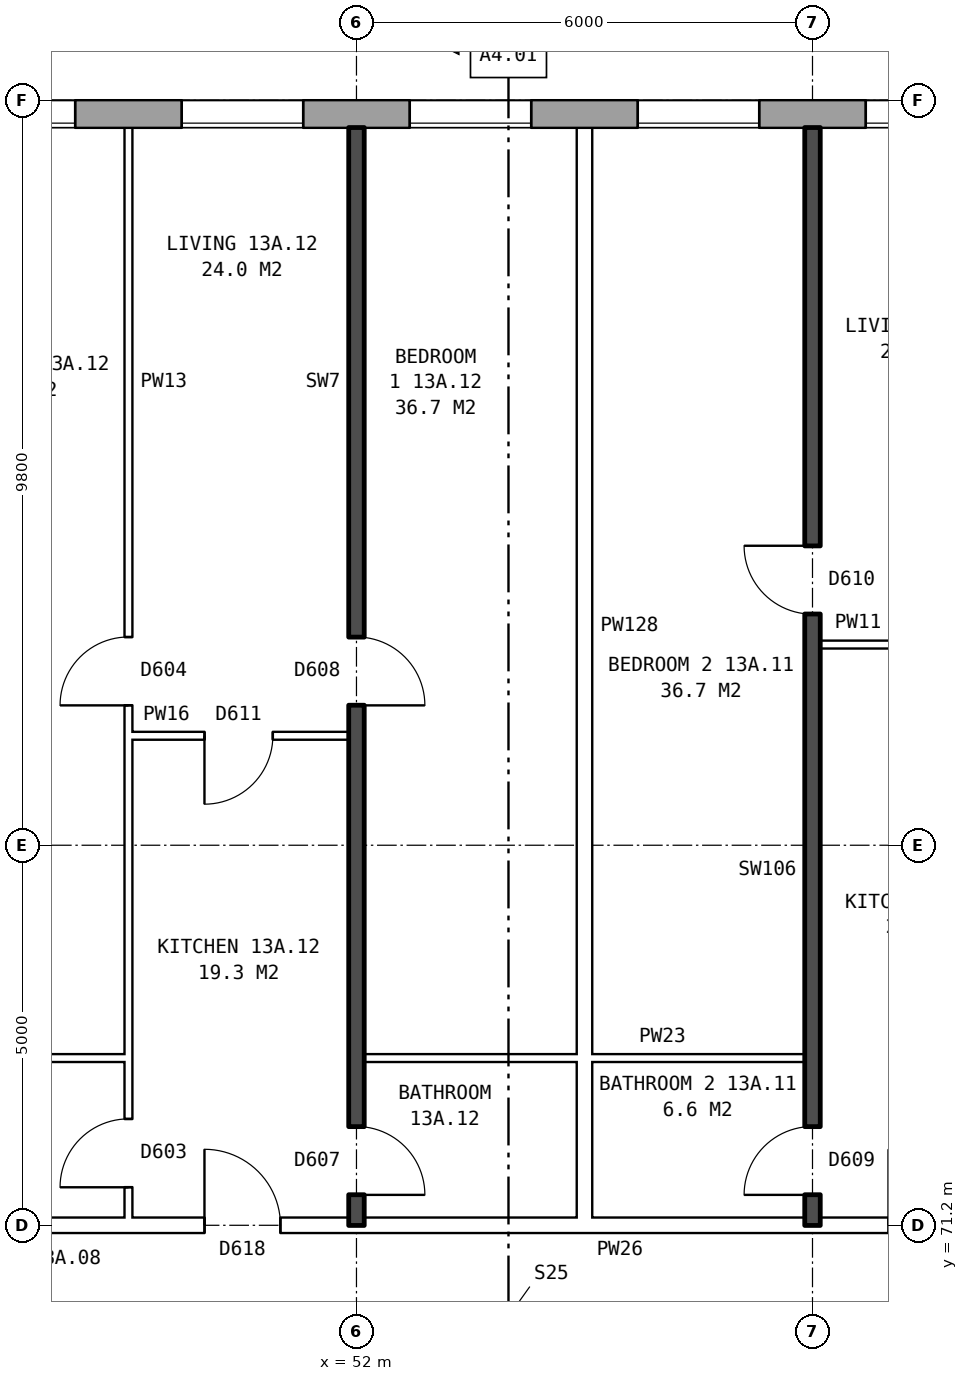
"""IFC4 building model, lengths in metres.
Left out: names, types, materials, properties, quantities, classifications, styles, units other than length and angle.
Written with IfcOpenShell. Run it as: python <this file> out.ifc"""

import sys

from ifc_helpers import new_model, si_unit, direction, frame, frame_2d, origin, place, context, subcontext, project, spatial, rectangle, extrude, element, fill, save


model = new_model("IFC4")
c1 = context("Model", 3, precision=1e-05, world=origin(), true_north=direction((0.0, 1.0)))
c2 = subcontext(c1, "Body", "Model", "MODEL_VIEW")
j1 = project(units=[si_unit("LENGTHUNIT", "METRE"), si_unit("PLANEANGLEUNIT", "RADIAN")], contexts=[c1])
p1 = place(None, origin())
s1 = spatial("IfcSite", under=j1, at=p1, CompositionType="ELEMENT")
p2 = place(p1, origin())
s2 = spatial("IfcBuilding", under=s1, at=p2, CompositionType="ELEMENT")
p3 = place(p2, frame((0.0, 0.0, 50.5)))
s3 = spatial("IfcBuildingStorey", under=s2, at=p3, CompositionType="ELEMENT", Elevation=50.5)
p4 = place(p3, frame((72.925, 85.82, 0.0), z_axis=(0.0, 0.0, 1.0), x_axis=(-1.0, 0.0, 0.0)))
e1 = element("IfcWall", 1, at=p4, inside=s3, PredefinedType="STANDARD", context=c2, shape_type="SweptSolid", body=[
    extrude(rectangle(XDim=48.351, YDim=0.36, at=frame_2d((24.175, 0.0))), origin(), (0.0, 0.0, 1.0), 2.85),
])
p5 = place(p4, frame((0.625, 0.0, 0.8)))
e2 = element("IfcOpeningElement", 2, at=p5, cuts=e1, PredefinedType="OPENING", context=c2, shape_type="SweptSolid", body=[
    extrude(rectangle(XDim=1.6, YDim=1.8, at=frame_2d((0.8, 0.9))), frame((0.0, 0.19, 0.0), z_axis=(0.0, -1.0, 0.0), x_axis=(1.0, 0.0, 0.0)), (0.0, 0.0, 1.0), 0.38),
])
p6 = place(p4, frame((3.625, 0.0, 0.8)))
e3 = element("IfcOpeningElement", 3, at=p6, cuts=e1, PredefinedType="OPENING", context=c2, shape_type="SweptSolid", body=[
    extrude(rectangle(XDim=1.6, YDim=1.8, at=frame_2d((0.8, 0.9))), frame((0.0, 0.19, 0.0), z_axis=(0.0, -1.0, 0.0), x_axis=(1.0, 0.0, 0.0)), (0.0, 0.0, 1.0), 0.38),
])
p7 = place(p4, frame((5.525, 0.0, 0.8)))
e4 = element("IfcOpeningElement", 4, at=p7, cuts=e1, PredefinedType="OPENING", context=c2, shape_type="SweptSolid", body=[
    extrude(rectangle(XDim=1.4, YDim=1.8, at=frame_2d((0.7, 0.9))), frame((0.0, 0.19, 0.0), z_axis=(0.0, -1.0, 0.0), x_axis=(1.0, 0.0, 0.0)), (0.0, 0.0, 1.0), 0.38),
])
p8 = place(p4, frame((9.225, 0.0, 0.45)))
e5 = element("IfcOpeningElement", 5, at=p8, cuts=e1, PredefinedType="OPENING", context=c2, shape_type="SweptSolid", body=[
    extrude(rectangle(XDim=1.0, YDim=0.9, at=frame_2d((0.5, 0.45))), frame((0.0, 0.19, 0.0), z_axis=(0.0, -1.0, 0.0), x_axis=(1.0, 0.0, 0.0)), (0.0, 0.0, 1.0), 0.38),
])
p9 = place(p4, frame((12.625, 0.0, 0.8)))
e6 = element("IfcOpeningElement", 6, at=p9, cuts=e1, PredefinedType="OPENING", context=c2, shape_type="SweptSolid", body=[
    extrude(rectangle(XDim=1.6, YDim=1.8, at=frame_2d((0.8, 0.9))), frame((0.0, 0.19, 0.0), z_axis=(0.0, -1.0, 0.0), x_axis=(1.0, 0.0, 0.0)), (0.0, 0.0, 1.0), 0.38),
])
p10 = place(p4, frame((15.625, 0.0, 0.8)))
e7 = element("IfcOpeningElement", 7, at=p10, cuts=e1, PredefinedType="OPENING", context=c2, shape_type="SweptSolid", body=[
    extrude(rectangle(XDim=1.6, YDim=1.8, at=frame_2d((0.8, 0.9))), frame((0.0, 0.19, 0.0), z_axis=(0.0, -1.0, 0.0), x_axis=(1.0, 0.0, 0.0)), (0.0, 0.0, 1.0), 0.38),
])
p11 = place(p4, frame((18.625, 0.0, 0.8)))
e8 = element("IfcOpeningElement", 8, at=p11, cuts=e1, PredefinedType="OPENING", context=c2, shape_type="SweptSolid", body=[
    extrude(rectangle(XDim=1.6, YDim=1.8, at=frame_2d((0.8, 0.9))), frame((0.0, 0.19, 0.0), z_axis=(0.0, -1.0, 0.0), x_axis=(1.0, 0.0, 0.0)), (0.0, 0.0, 1.0), 0.38),
])
p12 = place(p4, frame((21.625, 0.0, 0.8)))
e9 = element("IfcOpeningElement", 9, at=p12, cuts=e1, PredefinedType="OPENING", context=c2, shape_type="SweptSolid", body=[
    extrude(rectangle(XDim=1.6, YDim=1.8, at=frame_2d((0.8, 0.9))), frame((0.0, 0.19, 0.0), z_axis=(0.0, -1.0, 0.0), x_axis=(1.0, 0.0, 0.0)), (0.0, 0.0, 1.0), 0.38),
])
p13 = place(p4, frame((24.625, 0.0, 0.8)))
e10 = element("IfcOpeningElement", 10, at=p13, cuts=e1, PredefinedType="OPENING", context=c2, shape_type="SweptSolid", body=[
    extrude(rectangle(XDim=1.6, YDim=1.8, at=frame_2d((0.8, 0.9))), frame((0.0, 0.19, 0.0), z_axis=(0.0, -1.0, 0.0), x_axis=(1.0, 0.0, 0.0)), (0.0, 0.0, 1.0), 0.38),
])
p14 = place(p4, frame((27.625, 0.0, 0.8)))
e11 = element("IfcOpeningElement", 11, at=p14, cuts=e1, PredefinedType="OPENING", context=c2, shape_type="SweptSolid", body=[
    extrude(rectangle(XDim=1.6, YDim=1.8, at=frame_2d((0.8, 0.9))), frame((0.0, 0.19, 0.0), z_axis=(0.0, -1.0, 0.0), x_axis=(1.0, 0.0, 0.0)), (0.0, 0.0, 1.0), 0.38),
])
p15 = place(p4, frame((30.625, 0.0, 0.8)))
e12 = element("IfcOpeningElement", 12, at=p15, cuts=e1, PredefinedType="OPENING", context=c2, shape_type="SweptSolid", body=[
    extrude(rectangle(XDim=1.6, YDim=1.8, at=frame_2d((0.8, 0.9))), frame((0.0, 0.19, 0.0), z_axis=(0.0, -1.0, 0.0), x_axis=(1.0, 0.0, 0.0)), (0.0, 0.0, 1.0), 0.38),
])
p16 = place(p4, frame((33.625, 0.0, 0.8)))
e13 = element("IfcOpeningElement", 13, at=p16, cuts=e1, PredefinedType="OPENING", context=c2, shape_type="SweptSolid", body=[
    extrude(rectangle(XDim=1.6, YDim=1.8, at=frame_2d((0.8, 0.9))), frame((0.0, 0.19, 0.0), z_axis=(0.0, -1.0, 0.0), x_axis=(1.0, 0.0, 0.0)), (0.0, 0.0, 1.0), 0.38),
])
p17 = place(p4, frame((36.125, 0.0, 0.8)))
e14 = element("IfcOpeningElement", 14, at=p17, cuts=e1, PredefinedType="OPENING", context=c2, shape_type="SweptSolid", body=[
    extrude(rectangle(XDim=1.0, YDim=1.8, at=frame_2d((0.5, 0.9))), frame((0.0, 0.19, 0.0), z_axis=(0.0, -1.0, 0.0), x_axis=(1.0, 0.0, 0.0)), (0.0, 0.0, 1.0), 0.38),
])
p18 = place(p4, frame((39.975, 0.0, 1.7)))
e15 = element("IfcOpeningElement", 15, at=p18, cuts=e1, PredefinedType="OPENING", context=c2, shape_type="SweptSolid", body=[
    extrude(rectangle(XDim=1.0, YDim=0.9, at=frame_2d((0.5, 0.45))), frame((0.0, 0.19, 0.0), z_axis=(0.0, -1.0, 0.0), x_axis=(1.0, 0.0, 0.0)), (0.0, 0.0, 1.0), 0.38),
])
p19 = place(p4, frame((42.625, 0.0, 0.8)))
e16 = element("IfcOpeningElement", 16, at=p19, cuts=e1, PredefinedType="OPENING", context=c2, shape_type="SweptSolid", body=[
    extrude(rectangle(XDim=1.6, YDim=1.8, at=frame_2d((0.8, 0.9))), frame((0.0, 0.19, 0.0), z_axis=(0.0, -1.0, 0.0), x_axis=(1.0, 0.0, 0.0)), (0.0, 0.0, 1.0), 0.38),
])
p20 = place(p4, frame((45.625, 0.0, 0.8)))
e17 = element("IfcOpeningElement", 17, at=p20, cuts=e1, PredefinedType="OPENING", context=c2, shape_type="SweptSolid", body=[
    extrude(rectangle(XDim=1.6, YDim=1.8, at=frame_2d((0.8, 0.9))), frame((0.0, 0.19, 0.0), z_axis=(0.0, -1.0, 0.0), x_axis=(1.0, 0.0, 0.0)), (0.0, 0.0, 1.0), 0.38),
])
p21 = place(p4, frame((7.225, 0.0, 1.6)))
e18 = element("IfcOpeningElement", 18, at=p21, cuts=e1, PredefinedType="OPENING", context=c2, shape_type="SweptSolid", body=[
    extrude(rectangle(XDim=1.0, YDim=0.9, at=frame_2d((0.5, 0.45))), frame((0.0, 0.19, 0.0), z_axis=(0.0, -1.0, 0.0), x_axis=(1.0, 0.0, 0.0)), (0.0, 0.0, 1.0), 0.38),
])
p22 = place(p4, frame((10.575, 0.0, 0.45)))
e19 = element("IfcOpeningElement", 19, at=p22, cuts=e1, PredefinedType="OPENING", context=c2, shape_type="SweptSolid", body=[
    extrude(rectangle(XDim=1.2, YDim=1.8, at=frame_2d((0.6, 0.9))), frame((0.0, 0.19, 0.0), z_axis=(0.0, -1.0, 0.0), x_axis=(1.0, 0.0, 0.0)), (0.0, 0.0, 1.0), 0.38),
])
p23 = place(p4, frame((37.425, 0.0, 0.8)))
e20 = element("IfcOpeningElement", 20, at=p23, cuts=e1, PredefinedType="OPENING", context=c2, shape_type="SweptSolid", body=[
    extrude(rectangle(XDim=1.0, YDim=0.9, at=frame_2d((0.5, 0.45))), frame((0.0, 0.19, 0.0), z_axis=(0.0, -1.0, 0.0), x_axis=(1.0, 0.0, 0.0)), (0.0, 0.0, 1.0), 0.38),
])
p24 = place(p4, frame((41.275, 0.0, 0.8)))
e21 = element("IfcOpeningElement", 21, at=p24, cuts=e1, PredefinedType="OPENING", context=c2, shape_type="SweptSolid", body=[
    extrude(rectangle(XDim=1.0, YDim=1.8, at=frame_2d((0.5, 0.9))), frame((0.0, 0.19, 0.0), z_axis=(0.0, -1.0, 0.0), x_axis=(1.0, 0.0, 0.0)), (0.0, 0.0, 1.0), 0.38),
])
p25 = place(p3, frame((44.36, 71.2, 0.0), z_axis=(0.0, 0.0, 1.0), x_axis=(1.0, 0.0, 0.0)))
e22 = element("IfcWall", 22, at=p25, inside=s3, PredefinedType="PARTITIONING", context=c2, shape_type="SweptSolid", body=[
    extrude(rectangle(XDim=19.28, YDim=0.2, at=frame_2d((9.64, 0.0))), origin(), (0.0, 0.0, 1.0), 2.85),
])
p26 = place(p25, frame((14.64, 0.0, 0.0)))
e23 = element("IfcOpeningElement", 23, at=p26, cuts=e22, PredefinedType="OPENING", context=c2, shape_type="SweptSolid", body=[
    extrude(rectangle(XDim=1.0, YDim=2.1, at=frame_2d((0.5, 1.05))), frame((0.0, 0.11, 0.0), z_axis=(0.0, -1.0, 0.0), x_axis=(1.0, 0.0, 0.0)), (0.0, 0.0, 1.0), 0.22),
])
p27 = place(p25, frame((5.64, 0.0, 0.0)))
e24 = element("IfcOpeningElement", 24, at=p27, cuts=e22, PredefinedType="OPENING", context=c2, shape_type="SweptSolid", body=[
    extrude(rectangle(XDim=1.0, YDim=2.1, at=frame_2d((0.5, 1.05))), frame((0.0, 0.11, 0.0), z_axis=(0.0, -1.0, 0.0), x_axis=(1.0, 0.0, 0.0)), (0.0, 0.0, 1.0), 0.22),
])
p28 = place(p3, frame((46.1, 73.4, 0.0), z_axis=(0.0, 0.0, 1.0), x_axis=(1.0, 0.0, 0.0)))
e25 = element("IfcWall", 25, at=p28, inside=s3, PredefinedType="PARTITIONING", context=c2, shape_type="SweptSolid", body=[
    extrude(rectangle(XDim=2.9, YDim=0.1, at=frame_2d((1.45, 0.0))), origin(), (0.0, 0.0, 1.0), 2.85),
])
p29 = place(p3, frame((52.1, 73.4, 0.0), z_axis=(0.0, 0.0, 1.0), x_axis=(1.0, 0.0, 0.0)))
e26 = element("IfcWall", 26, at=p29, inside=s3, PredefinedType="PARTITIONING", context=c2, shape_type="SweptSolid", body=[
    extrude(rectangle(XDim=5.8, YDim=0.1, at=frame_2d((2.9, 0.0))), origin(), (0.0, 0.0, 1.0), 2.85),
])
p30 = place(p3, frame((49.0, 77.64, 0.0), z_axis=(0.0, 0.0, 1.0), x_axis=(1.0, 0.0, 0.0)))
e27 = element("IfcWall", 27, at=p30, inside=s3, PredefinedType="PARTITIONING", context=c2, shape_type="SweptSolid", body=[
    extrude(rectangle(XDim=2.9, YDim=0.1, at=frame_2d((1.45, 0.0))), origin(), (0.0, 0.0, 1.0), 2.85),
])
p31 = place(p30, frame((1.0, 0.0, 0.0)))
e28 = element("IfcOpeningElement", 28, at=p31, cuts=e27, PredefinedType="OPENING", context=c2, shape_type="SweptSolid", body=[
    extrude(rectangle(XDim=0.9, YDim=2.1, at=frame_2d((0.45, 1.05))), frame((0.0, 0.06, 0.0), z_axis=(0.0, -1.0, 0.0), x_axis=(1.0, 0.0, 0.0)), (0.0, 0.0, 1.0), 0.12),
])
p32 = place(p3, frame((58.1, 78.84, 0.0), z_axis=(0.0, 0.0, 1.0), x_axis=(1.0, 0.0, 0.0)))
e29 = element("IfcWall", 29, at=p32, inside=s3, PredefinedType="PARTITIONING", context=c2, shape_type="SweptSolid", body=[
    extrude(rectangle(XDim=2.9, YDim=0.1, at=frame_2d((1.45, 0.0))), origin(), (0.0, 0.0, 1.0), 2.85),
])
p33 = place(p32, frame((1.0, 0.0, 0.0)))
e30 = element("IfcOpeningElement", 30, at=p33, cuts=e29, PredefinedType="OPENING", context=c2, shape_type="SweptSolid", body=[
    extrude(rectangle(XDim=0.9, YDim=2.1, at=frame_2d((0.45, 1.05))), frame((0.0, 0.06, 0.0), z_axis=(0.0, -1.0, 0.0), x_axis=(1.0, 0.0, 0.0)), (0.0, 0.0, 1.0), 0.12),
])
p34 = place(p3, frame((49.0, 71.3, 0.0), z_axis=(0.0, 0.0, 1.0), x_axis=(0.0, 1.0, 0.0)))
e31 = element("IfcWall", 31, at=p34, inside=s3, PredefinedType="PARTITIONING", context=c2, shape_type="SweptSolid", body=[
    extrude(rectangle(XDim=14.34, YDim=0.1, at=frame_2d((7.17, 0.0))), origin(), (0.0, 0.0, 1.0), 2.85),
])
p35 = place(p34, frame((6.74, 0.0, 0.0)))
e32 = element("IfcOpeningElement", 32, at=p35, cuts=e31, PredefinedType="OPENING", context=c2, shape_type="SweptSolid", body=[
    extrude(rectangle(XDim=0.9, YDim=2.1, at=frame_2d((0.45, 1.05))), frame((0.0, 0.06, 0.0), z_axis=(0.0, -1.0, 0.0), x_axis=(1.0, 0.0, 0.0)), (0.0, 0.0, 1.0), 0.12),
])
p36 = place(p34, frame((0.4, 0.0, 0.0)))
e33 = element("IfcOpeningElement", 33, at=p36, cuts=e31, PredefinedType="OPENING", context=c2, shape_type="SweptSolid", body=[
    extrude(rectangle(XDim=0.9, YDim=2.1, at=frame_2d((0.45, 1.05))), frame((0.0, 0.06, 0.0), z_axis=(0.0, -1.0, 0.0), x_axis=(1.0, 0.0, 0.0)), (0.0, 0.0, 1.0), 0.12),
])
p37 = place(p3, frame((52.0, 71.2, 0.0), z_axis=(0.0, 0.0, 1.0), x_axis=(0.0, 1.0, 0.0)))
e34 = element("IfcWall", 34, at=p37, inside=s3, PredefinedType="SOLIDWALL", context=c2, shape_type="SweptSolid", body=[
    extrude(rectangle(XDim=14.44, YDim=0.2, at=frame_2d((7.22, 0.0))), origin(), (0.0, 0.0, 1.0), 2.85),
])
p38 = place(p37, frame((6.84, 0.0, 0.0)))
e35 = element("IfcOpeningElement", 35, at=p38, cuts=e34, PredefinedType="OPENING", context=c2, shape_type="SweptSolid", body=[
    extrude(rectangle(XDim=0.9, YDim=2.1, at=frame_2d((0.45, 1.05))), frame((0.0, 0.11, 0.0), z_axis=(0.0, -1.0, 0.0), x_axis=(1.0, 0.0, 0.0)), (0.0, 0.0, 1.0), 0.22),
])
p39 = place(p37, frame((0.4, 0.0, 0.0)))
e36 = element("IfcOpeningElement", 36, at=p39, cuts=e34, PredefinedType="OPENING", context=c2, shape_type="SweptSolid", body=[
    extrude(rectangle(XDim=0.9, YDim=2.1, at=frame_2d((0.45, 1.05))), frame((0.0, 0.11, 0.0), z_axis=(0.0, -1.0, 0.0), x_axis=(1.0, 0.0, 0.0)), (0.0, 0.0, 1.0), 0.22),
])
p40 = place(p3, frame((55.0, 71.3, 0.0), z_axis=(0.0, 0.0, 1.0), x_axis=(0.0, 1.0, 0.0)))
e37 = element("IfcWall", 37, at=p40, inside=s3, PredefinedType="PARTITIONING", context=c2, shape_type="SweptSolid", body=[
    extrude(rectangle(XDim=14.34, YDim=0.2, at=frame_2d((7.17, 0.0))), origin(), (0.0, 0.0, 1.0), 2.85),
])
p41 = place(p3, frame((58.0, 71.2, 0.0), z_axis=(0.0, 0.0, 1.0), x_axis=(0.0, 1.0, 0.0)))
e38 = element("IfcWall", 38, at=p41, inside=s3, PredefinedType="SOLIDWALL", context=c2, shape_type="SweptSolid", body=[
    extrude(rectangle(XDim=14.44, YDim=0.2, at=frame_2d((7.22, 0.0))), origin(), (0.0, 0.0, 1.0), 2.85),
])
p42 = place(p41, frame((8.04, 0.0, 0.0)))
e39 = element("IfcOpeningElement", 39, at=p42, cuts=e38, PredefinedType="OPENING", context=c2, shape_type="SweptSolid", body=[
    extrude(rectangle(XDim=0.9, YDim=2.1, at=frame_2d((0.45, 1.05))), frame((0.0, 0.11, 0.0), z_axis=(0.0, -1.0, 0.0), x_axis=(1.0, 0.0, 0.0)), (0.0, 0.0, 1.0), 0.22),
])
p43 = place(p41, frame((0.4, 0.0, 0.0)))
e40 = element("IfcOpeningElement", 40, at=p43, cuts=e38, PredefinedType="OPENING", context=c2, shape_type="SweptSolid", body=[
    extrude(rectangle(XDim=0.9, YDim=2.1, at=frame_2d((0.45, 1.05))), frame((0.0, 0.11, 0.0), z_axis=(0.0, -1.0, 0.0), x_axis=(1.0, 0.0, 0.0)), (0.0, 0.0, 1.0), 0.22),
])
p44 = place(p9, origin())
e41 = element("IfcWindow", 41, at=p44, inside=s3, PartitioningType="SINGLE_PANEL", PredefinedType="WINDOW", context=c2, shape_type="SweptSolid", body=[
    extrude(rectangle(XDim=1.6, YDim=1.8, at=frame_2d((0.8, 0.9))), frame((0.0, 0.15, 0.0), z_axis=(0.0, -1.0, 0.0), x_axis=(1.0, 0.0, 0.0)), (0.0, 0.0, 1.0), 0.06),
])
fill(e6, e41)
p45 = place(p10, origin())
e42 = element("IfcWindow", 42, at=p45, inside=s3, PartitioningType="SINGLE_PANEL", PredefinedType="WINDOW", context=c2, shape_type="SweptSolid", body=[
    extrude(rectangle(XDim=1.6, YDim=1.8, at=frame_2d((0.8, 0.9))), frame((0.0, 0.15, 0.0), z_axis=(0.0, -1.0, 0.0), x_axis=(1.0, 0.0, 0.0)), (0.0, 0.0, 1.0), 0.06),
])
fill(e7, e42)
p46 = place(p11, origin())
e43 = element("IfcWindow", 43, at=p46, inside=s3, PartitioningType="SINGLE_PANEL", PredefinedType="WINDOW", context=c2, shape_type="SweptSolid", body=[
    extrude(rectangle(XDim=1.6, YDim=1.8, at=frame_2d((0.8, 0.9))), frame((0.0, 0.15, 0.0), z_axis=(0.0, -1.0, 0.0), x_axis=(1.0, 0.0, 0.0)), (0.0, 0.0, 1.0), 0.06),
])
fill(e8, e43)
p47 = place(p12, origin())
e44 = element("IfcWindow", 44, at=p47, inside=s3, PartitioningType="SINGLE_PANEL", PredefinedType="WINDOW", context=c2, shape_type="SweptSolid", body=[
    extrude(rectangle(XDim=1.6, YDim=1.8, at=frame_2d((0.8, 0.9))), frame((0.0, 0.15, 0.0), z_axis=(0.0, -1.0, 0.0), x_axis=(1.0, 0.0, 0.0)), (0.0, 0.0, 1.0), 0.06),
])
fill(e9, e44)
p48 = place(p13, origin())
e45 = element("IfcWindow", 45, at=p48, inside=s3, PartitioningType="SINGLE_PANEL", PredefinedType="WINDOW", context=c2, shape_type="SweptSolid", body=[
    extrude(rectangle(XDim=1.6, YDim=1.8, at=frame_2d((0.8, 0.9))), frame((0.0, 0.15, 0.0), z_axis=(0.0, -1.0, 0.0), x_axis=(1.0, 0.0, 0.0)), (0.0, 0.0, 1.0), 0.06),
])
fill(e10, e45)
p49 = place(p42, origin())
e46 = element("IfcDoor", 46, at=p49, inside=s3, OperationType="SINGLE_SWING_RIGHT", PredefinedType="DOOR", context=c2, shape_type="SweptSolid", body=[
    extrude(rectangle(XDim=0.9, YDim=2.1, at=frame_2d((0.45, 1.05))), frame((0.0, 0.025, 0.0), z_axis=(0.0, -1.0, 0.0), x_axis=(1.0, 0.0, 0.0)), (0.0, 0.0, 1.0), 0.05),
])
fill(e39, e46)
p50 = place(p43, origin())
e47 = element("IfcDoor", 47, at=p50, inside=s3, OperationType="SINGLE_SWING_LEFT", PredefinedType="DOOR", context=c2, shape_type="SweptSolid", body=[
    extrude(rectangle(XDim=0.9, YDim=2.1, at=frame_2d((0.45, 1.05))), frame((0.0, 0.025, 0.0), z_axis=(0.0, -1.0, 0.0), x_axis=(1.0, 0.0, 0.0)), (0.0, 0.0, 1.0), 0.05),
])
fill(e40, e47)
p51 = place(p38, frame((0.9, 0.0, 0.0), z_axis=(0.0, 0.0, 1.0), x_axis=(-1.0, 0.0, 0.0)))
e48 = element("IfcDoor", 48, at=p51, inside=s3, OperationType="SINGLE_SWING_RIGHT", PredefinedType="DOOR", context=c2, shape_type="SweptSolid", body=[
    extrude(rectangle(XDim=0.9, YDim=2.1, at=frame_2d((0.45, 1.05))), frame((0.0, 0.025, 0.0), z_axis=(0.0, -1.0, 0.0), x_axis=(1.0, 0.0, 0.0)), (0.0, 0.0, 1.0), 0.05),
])
fill(e35, e48)
p52 = place(p35, origin())
e49 = element("IfcDoor", 49, at=p52, inside=s3, OperationType="SINGLE_SWING_LEFT", PredefinedType="DOOR", context=c2, shape_type="SweptSolid", body=[
    extrude(rectangle(XDim=0.9, YDim=2.1, at=frame_2d((0.45, 1.05))), frame((0.0, 0.025, 0.0), z_axis=(0.0, -1.0, 0.0), x_axis=(1.0, 0.0, 0.0)), (0.0, 0.0, 1.0), 0.05),
])
fill(e32, e49)
p53 = place(p27, origin())
e50 = element("IfcDoor", 50, at=p53, inside=s3, OperationType="SINGLE_SWING_LEFT", PredefinedType="DOOR", context=c2, shape_type="SweptSolid", body=[
    extrude(rectangle(XDim=1.0, YDim=2.1, at=frame_2d((0.5, 1.05))), frame((0.0, 0.025, 0.0), z_axis=(0.0, -1.0, 0.0), x_axis=(1.0, 0.0, 0.0)), (0.0, 0.0, 1.0), 0.05),
])
fill(e24, e50)
p54 = place(p31, frame((0.9, 0.0, 0.0), z_axis=(0.0, 0.0, 1.0), x_axis=(-1.0, 0.0, 0.0)))
e51 = element("IfcDoor", 51, at=p54, inside=s3, OperationType="SINGLE_SWING_RIGHT", PredefinedType="DOOR", context=c2, shape_type="SweptSolid", body=[
    extrude(rectangle(XDim=0.9, YDim=2.1, at=frame_2d((0.45, 1.05))), frame((0.0, 0.025, 0.0), z_axis=(0.0, -1.0, 0.0), x_axis=(1.0, 0.0, 0.0)), (0.0, 0.0, 1.0), 0.05),
])
fill(e28, e51)
p55 = place(p39, frame((0.9, 0.0, 0.0), z_axis=(0.0, 0.0, 1.0), x_axis=(-1.0, 0.0, 0.0)))
e52 = element("IfcDoor", 52, at=p55, inside=s3, OperationType="SINGLE_SWING_RIGHT", PredefinedType="DOOR", context=c2, shape_type="SweptSolid", body=[
    extrude(rectangle(XDim=0.9, YDim=2.1, at=frame_2d((0.45, 1.05))), frame((0.0, 0.025, 0.0), z_axis=(0.0, -1.0, 0.0), x_axis=(1.0, 0.0, 0.0)), (0.0, 0.0, 1.0), 0.05),
])
fill(e36, e52)
p56 = place(p36, origin())
e53 = element("IfcDoor", 53, at=p56, inside=s3, OperationType="SINGLE_SWING_LEFT", PredefinedType="DOOR", context=c2, shape_type="SweptSolid", body=[
    extrude(rectangle(XDim=0.9, YDim=2.1, at=frame_2d((0.45, 1.05))), frame((0.0, 0.025, 0.0), z_axis=(0.0, -1.0, 0.0), x_axis=(1.0, 0.0, 0.0)), (0.0, 0.0, 1.0), 0.05),
])
fill(e33, e53)
save(model, sys.argv[1])
